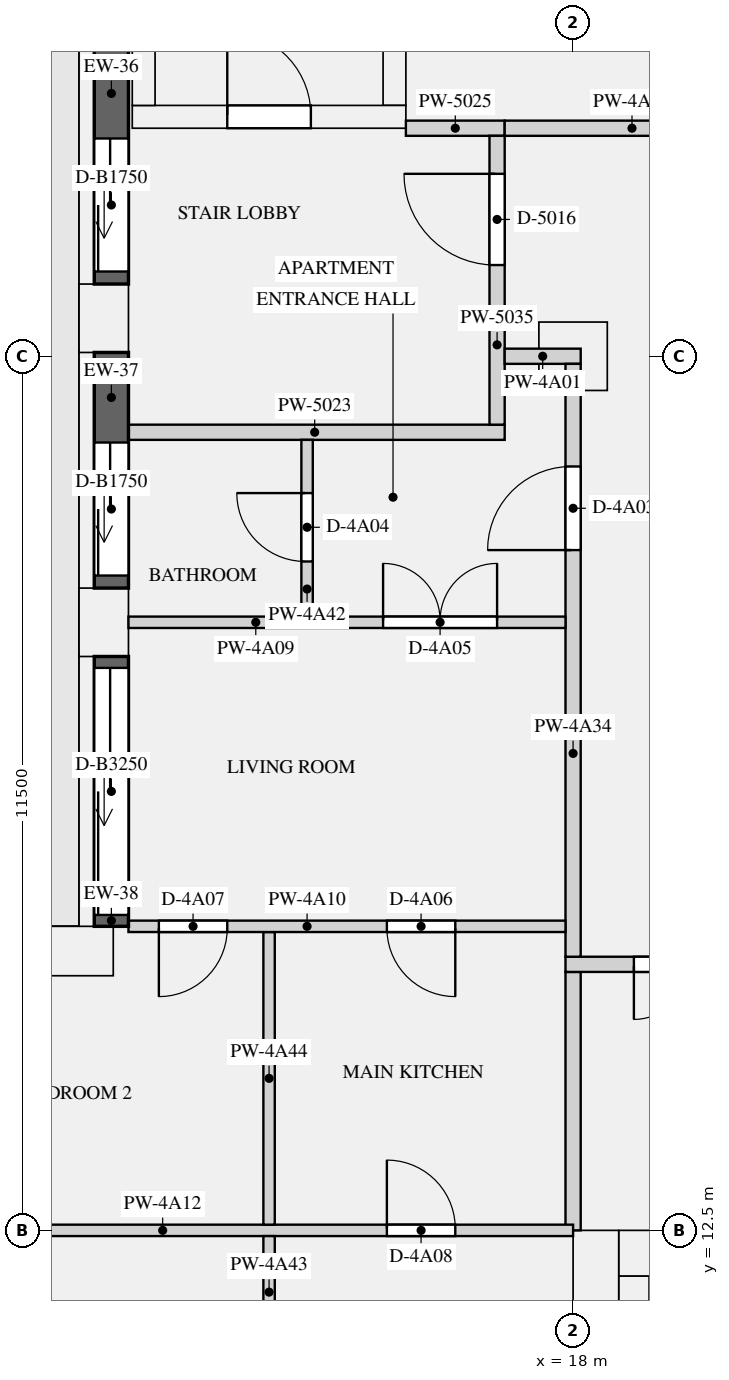
"""IFC4 building model, lengths in metres.
Left out: names, types, materials, properties, quantities, classifications, styles, units other than length and angle.
Written with IfcOpenShell. Run it as: python <this file> out.ifc"""

import sys

from ifc_helpers import new_model, si_unit, direction, frame, frame_2d, origin, origin_2d, place, context, subcontext, project, spatial, rectangle, extrude, element, fill, save


model = new_model("IFC4")
c1 = context("Model", 3, precision=1e-05, world=origin(), true_north=direction((0.0, 1.0)))
c2 = subcontext(c1, "Body", "Model", "MODEL_VIEW")
j1 = project(units=[si_unit("LENGTHUNIT", "METRE"), si_unit("PLANEANGLEUNIT", "RADIAN")], contexts=[c1])
p1 = place(None, origin())
s1 = spatial("IfcSite", under=j1, at=p1, CompositionType="ELEMENT")
p2 = place(p1, origin())
s2 = spatial("IfcBuilding", under=s1, at=p2, CompositionType="ELEMENT")
p3 = place(p2, frame((0.0, 0.0, 198.0)))
s3 = spatial("IfcBuildingStorey", under=s2, at=p3, CompositionType="ELEMENT", Elevation=198.0)
for number, where, z_axis, x_axis in (
    (1, (11.825, 24.5, 0.0), (0.0, 0.0, 1.0), (0.0, -1.0, 0.0)),
    (2, (11.825, 20.5, 0.0), (0.0, 0.0, 1.0), (0.0, -1.0, 0.0)),
    (3, (11.5, 16.175, 0.0), (0.0, 0.0, 1.0), (-1.0, 0.0, 0.0)),
):
    element("IfcColumn", number, at=place(p3, frame(where, z_axis=z_axis, x_axis=x_axis)), inside=s3, PredefinedType="USERDEFINED", context=c2, shape_type="SweptSolid", body=[
        extrude(rectangle(XDim=0.9, YDim=0.65, at=origin_2d()), origin(), (0.0, 0.0, 1.0), 3.15),
    ])
p4 = place(p3, frame((18.0, 24.0, 0.0), z_axis=(0.0, 0.0, 1.0), x_axis=(1.0, 0.0, 0.0)))
e4 = element("IfcColumn", 4, at=p4, inside=s3, PredefinedType="COLUMN", context=c2, shape_type="SweptSolid", body=[
    extrude(rectangle(XDim=0.9, YDim=0.9, at=origin_2d()), origin(), (0.0, 0.0, 1.0), 3.15),
])
p5 = place(p3, frame((18.3, 0.0, 0.0), z_axis=(0.0, 0.0, 1.0), x_axis=(0.0, 1.0, 0.0)))
e5 = element("IfcWall", 5, at=p5, inside=s3, PredefinedType="SHEAR", context=c2, shape_type="SweptSolid", body=[
    extrude(rectangle(XDim=12.5, YDim=0.6, at=frame_2d((6.25, 0.0))), origin(), (0.0, 0.0, 1.0), 3.15),
])
p6 = place(p3, frame((18.6, 12.2, 0.0), z_axis=(0.0, 0.0, 1.0), x_axis=(1.0, 0.0, 0.0)))
e6 = element("IfcWall", 6, at=p6, inside=s3, PredefinedType="SHEAR", context=c2, shape_type="SweptSolid", body=[
    extrude(rectangle(XDim=34.8, YDim=0.6, at=frame_2d((17.4, 0.0))), origin(), (0.0, 0.0, 1.0), 3.15),
])
p7 = place(p6, frame((24.575, 0.0, 0.0)))
e7 = element("IfcOpeningElement", 7, at=p7, cuts=e6, PredefinedType="OPENING", context=c2, shape_type="SweptSolid", body=[
    extrude(rectangle(XDim=1.1, YDim=2.1, at=frame_2d((0.55, 1.05))), frame((0.0, 0.31, 0.0), z_axis=(0.0, -1.0, 0.0), x_axis=(1.0, 0.0, 0.0)), (0.0, 0.0, 1.0), 0.62),
])
p8 = place(p6, frame((26.825, 0.0, 0.0)))
e8 = element("IfcOpeningElement", 8, at=p8, cuts=e6, PredefinedType="OPENING", context=c2, shape_type="SweptSolid", body=[
    extrude(rectangle(XDim=1.1, YDim=2.1, at=frame_2d((0.55, 1.05))), frame((0.0, 0.31, 0.0), z_axis=(0.0, -1.0, 0.0), x_axis=(1.0, 0.0, 0.0)), (0.0, 0.0, 1.0), 0.62),
])
p9 = place(p6, frame((29.075, 0.0, 0.0)))
e9 = element("IfcOpeningElement", 9, at=p9, cuts=e6, PredefinedType="OPENING", context=c2, shape_type="SweptSolid", body=[
    extrude(rectangle(XDim=1.1, YDim=2.1, at=frame_2d((0.55, 1.05))), frame((0.0, 0.31, 0.0), z_axis=(0.0, -1.0, 0.0), x_axis=(1.0, 0.0, 0.0)), (0.0, 0.0, 1.0), 0.62),
])
p10 = place(p6, frame((4.95, 0.0, 0.0)))
e10 = element("IfcOpeningElement", 10, at=p10, cuts=e6, PredefinedType="OPENING", context=c2, shape_type="SweptSolid", body=[
    extrude(rectangle(XDim=0.9, YDim=2.1, at=frame_2d((0.45, 1.05))), frame((0.0, 0.31, 0.0), z_axis=(0.0, -1.0, 0.0), x_axis=(1.0, 0.0, 0.0)), (0.0, 0.0, 1.0), 0.62),
])
p11 = place(p6, frame((18.45, 0.0, 0.0)))
e11 = element("IfcOpeningElement", 11, at=p11, cuts=e6, PredefinedType="OPENING", context=c2, shape_type="SweptSolid", body=[
    extrude(rectangle(XDim=0.9, YDim=2.1, at=frame_2d((0.45, 1.05))), frame((0.0, 0.31, 0.0), z_axis=(0.0, -1.0, 0.0), x_axis=(1.0, 0.0, 0.0)), (0.0, 0.0, 1.0), 0.62),
])
p12 = place(p6, frame((1.55, 0.0, 0.0)))
e12 = element("IfcOpeningElement", 12, at=p12, cuts=e6, PredefinedType="OPENING", context=c2, shape_type="SweptSolid", body=[
    extrude(rectangle(XDim=1.2, YDim=2.1, at=frame_2d((0.6, 1.05))), frame((0.0, 0.31, 0.0), z_axis=(0.0, -1.0, 0.0), x_axis=(1.0, 0.0, 0.0)), (0.0, 0.0, 1.0), 0.62),
])
p13 = place(p6, frame((32.05, 0.0, 0.0)))
e13 = element("IfcOpeningElement", 13, at=p13, cuts=e6, PredefinedType="OPENING", context=c2, shape_type="SweptSolid", body=[
    extrude(rectangle(XDim=1.2, YDim=2.1, at=frame_2d((0.6, 1.05))), frame((0.0, 0.31, 0.0), z_axis=(0.0, -1.0, 0.0), x_axis=(1.0, 0.0, 0.0)), (0.0, 0.0, 1.0), 0.62),
])
p14 = place(p3, frame((18.8, 1.0, 0.0), z_axis=(0.0, 0.0, 1.0), x_axis=(0.0, 1.0, 0.0)))
e14 = element("IfcWall", 14, at=p14, inside=s3, PredefinedType="SHEAR", context=c2, shape_type="SweptSolid", body=[
    extrude(rectangle(XDim=10.9, YDim=0.4, at=frame_2d((5.45, 0.0))), origin(), (0.0, 0.0, 1.0), 3.15),
])
p15 = place(p3, frame((12.2, 27.15, 0.0), z_axis=(0.0, 0.0, 1.0), x_axis=(1.0, 0.0, 0.0)))
e15 = element("IfcWall", 15, at=p15, inside=s3, PredefinedType="SHEAR", context=c2, shape_type="SweptSolid", body=[
    extrude(rectangle(XDim=3.6, YDim=0.3, at=frame_2d((1.8, 0.0))), origin(), (0.0, 0.0, 1.0), 3.15),
])
p16 = place(p15, frame((1.25, 0.0, 0.0)))
e16 = element("IfcOpeningElement", 16, at=p16, cuts=e15, PredefinedType="OPENING", context=c2, shape_type="SweptSolid", body=[
    extrude(rectangle(XDim=1.1, YDim=2.1, at=frame_2d((0.55, 1.05))), frame((0.0, 0.16, 0.0), z_axis=(0.0, -1.0, 0.0), x_axis=(1.0, 0.0, 0.0)), (0.0, 0.0, 1.0), 0.32),
])
for number, where, z_axis, x_axis in (
    (17, (12.35, 27.3, 0.0), (0.0, 0.0, 1.0), (0.0, 1.0, 0.0)),
    (18, (15.65, 27.3, 0.0), (0.0, 0.0, 1.0), (0.0, 1.0, 0.0)),
):
    element("IfcWall", number, at=place(p3, frame(where, z_axis=z_axis, x_axis=x_axis)), inside=s3, PredefinedType="SHEAR", context=c2, shape_type="SweptSolid", body=[
        extrude(rectangle(XDim=7.8, YDim=0.3, at=frame_2d((3.9, 0.0))), origin(), (0.0, 0.0, 1.0), 3.15),
    ])
p17 = place(p3, frame((11.925, 28.05, 0.0), z_axis=(0.0, 0.0, 1.0), x_axis=(0.0, -1.0, 0.0)))
e19 = element("IfcWall", 19, at=p17, inside=s3, PredefinedType="SOLIDWALL", context=c2, shape_type="SweptSolid", body=[
    extrude(rectangle(XDim=3.1, YDim=0.45, at=frame_2d((1.55, 0.0))), origin(), (0.0, 0.0, 1.0), 2.83),
])
p18 = place(p17, frame((1.185, 0.0, 0.0)))
e20 = element("IfcOpeningElement", 20, at=p18, cuts=e19, PredefinedType="OPENING", context=c2, shape_type="SweptSolid", body=[
    extrude(rectangle(XDim=1.75, YDim=2.3, at=frame_2d((0.875, 1.15))), frame((0.0, 0.235, 0.0), z_axis=(0.0, -1.0, 0.0), x_axis=(1.0, 0.0, 0.0)), (0.0, 0.0, 1.0), 0.47),
])
p19 = place(p3, frame((11.925, 24.05, 0.0), z_axis=(0.0, 0.0, 1.0), x_axis=(0.0, -1.0, 0.0)))
e21 = element("IfcWall", 21, at=p19, inside=s3, PredefinedType="SOLIDWALL", context=c2, shape_type="SweptSolid", body=[
    extrude(rectangle(XDim=3.1, YDim=0.45, at=frame_2d((1.55, 0.0))), origin(), (0.0, 0.0, 1.0), 2.83),
])
p20 = place(p19, frame((1.185, 0.0, 0.0)))
e22 = element("IfcOpeningElement", 22, at=p20, cuts=e21, PredefinedType="OPENING", context=c2, shape_type="SweptSolid", body=[
    extrude(rectangle(XDim=1.75, YDim=2.3, at=frame_2d((0.875, 1.15))), frame((0.0, 0.235, 0.0), z_axis=(0.0, -1.0, 0.0), x_axis=(1.0, 0.0, 0.0)), (0.0, 0.0, 1.0), 0.47),
])
p21 = place(p3, frame((11.925, 20.05, 0.0), z_axis=(0.0, 0.0, 1.0), x_axis=(0.0, -1.0, 0.0)))
e23 = element("IfcWall", 23, at=p21, inside=s3, PredefinedType="SOLIDWALL", context=c2, shape_type="SweptSolid", body=[
    extrude(rectangle(XDim=3.55, YDim=0.45, at=frame_2d((1.775, 0.0))), origin(), (0.0, 0.0, 1.0), 2.83),
])
p22 = place(p21, frame((0.15, 0.0, 0.0)))
e24 = element("IfcOpeningElement", 24, at=p22, cuts=e23, PredefinedType="OPENING", context=c2, shape_type="SweptSolid", body=[
    extrude(rectangle(XDim=3.25, YDim=2.3, at=frame_2d((1.625, 1.15))), frame((0.0, 0.235, 0.0), z_axis=(0.0, -1.0, 0.0), x_axis=(1.0, 0.0, 0.0)), (0.0, 0.0, 1.0), 0.47),
])
p23 = place(p3, frame((12.1, 23.0, 0.0), z_axis=(0.0, 0.0, 1.0), x_axis=(1.0, 0.0, 0.0)))
e25 = element("IfcWall", 25, at=p23, inside=s3, PredefinedType="PARTITIONING", context=c2, shape_type="SweptSolid", body=[
    extrude(rectangle(XDim=5.0, YDim=0.2, at=frame_2d((2.5, 0.0))), origin(), (0.0, 0.0, 1.0), 2.83),
])
p24 = place(p3, frame((15.8, 27.0, 0.0), z_axis=(0.0, 0.0, 1.0), x_axis=(1.0, 0.0, 0.0)))
e26 = element("IfcWall", 26, at=p24, inside=s3, PredefinedType="PARTITIONING", context=c2, shape_type="SweptSolid", body=[
    extrude(rectangle(XDim=1.3, YDim=0.2, at=frame_2d((0.65, 0.0))), origin(), (0.0, 0.0, 1.0), 2.83),
])
p25 = place(p3, frame((18.0, 12.5, 0.0), z_axis=(0.0, 0.0, 1.0), x_axis=(0.0, 1.0, 0.0)))
e27 = element("IfcWall", 27, at=p25, inside=s3, PredefinedType="PARTITIONING", context=c2, shape_type="SweptSolid", body=[
    extrude(rectangle(XDim=3.4, YDim=0.2, at=frame_2d((1.7, 0.0))), origin(), (0.0, 0.0, 1.0), 2.83),
])
p26 = place(p3, frame((17.0, 23.1, 0.0), z_axis=(0.0, 0.0, 1.0), x_axis=(0.0, 1.0, 0.0)))
e28 = element("IfcWall", 28, at=p26, inside=s3, PredefinedType="PARTITIONING", context=c2, shape_type="SweptSolid", body=[
    extrude(rectangle(XDim=3.8, YDim=0.2, at=frame_2d((1.9, 0.0))), origin(), (0.0, 0.0, 1.0), 2.83),
])
p27 = place(p26, frame((2.1, 0.0, 0.0)))
e29 = element("IfcOpeningElement", 29, at=p27, cuts=e28, PredefinedType="OPENING", context=c2, shape_type="SweptSolid", body=[
    extrude(rectangle(XDim=1.2, YDim=2.1, at=frame_2d((0.6, 1.05))), frame((0.0, 0.11, 0.0), z_axis=(0.0, -1.0, 0.0), x_axis=(1.0, 0.0, 0.0)), (0.0, 0.0, 1.0), 0.22),
])
p28 = place(p3, frame((17.1, 24.0, 0.0), z_axis=(0.0, 0.0, 1.0), x_axis=(1.0, 0.0, 0.0)))
e30 = element("IfcWall", 30, at=p28, inside=s3, PredefinedType="PARTITIONING", context=c2, shape_type="SweptSolid", body=[
    extrude(rectangle(XDim=1.0, YDim=0.2, at=frame_2d((0.5, 0.0))), origin(), (0.0, 0.0, 1.0), 2.83),
])
p29 = place(p3, frame((17.1, 27.0, 0.0), z_axis=(0.0, 0.0, 1.0), x_axis=(1.0, 0.0, 0.0)))
e31 = element("IfcWall", 31, at=p29, inside=s3, PredefinedType="PARTITIONING", context=c2, shape_type="SweptSolid", body=[
    extrude(rectangle(XDim=6.975, YDim=0.2, at=frame_2d((3.487, 0.0))), origin(), (0.0, 0.0, 1.0), 2.83),
])
p30 = place(p29, frame((3.35, 0.0, 0.0)))
e32 = element("IfcOpeningElement", 32, at=p30, cuts=e31, PredefinedType="OPENING", context=c2, shape_type="SweptSolid", body=[
    extrude(rectangle(XDim=1.1, YDim=2.1, at=frame_2d((0.55, 1.05))), frame((0.0, 0.11, 0.0), z_axis=(0.0, -1.0, 0.0), x_axis=(1.0, 0.0, 0.0)), (0.0, 0.0, 1.0), 0.22),
])
p31 = place(p3, frame((12.15, 20.5, 0.0), z_axis=(0.0, 0.0, 1.0), x_axis=(1.0, 0.0, 0.0)))
e33 = element("IfcWall", 33, at=p31, inside=s3, PredefinedType="PARTITIONING", context=c2, shape_type="SweptSolid", body=[
    extrude(rectangle(XDim=5.75, YDim=0.15, at=frame_2d((2.875, 0.0))), origin(), (0.0, 0.0, 1.0), 2.83),
])
p32 = place(p31, frame((3.35, 0.0, 0.0)))
e34 = element("IfcOpeningElement", 34, at=p32, cuts=e33, PredefinedType="OPENING", context=c2, shape_type="SweptSolid", body=[
    extrude(rectangle(XDim=1.5, YDim=2.1, at=frame_2d((0.75, 1.05))), frame((0.0, 0.085, 0.0), z_axis=(0.0, -1.0, 0.0), x_axis=(1.0, 0.0, 0.0)), (0.0, 0.0, 1.0), 0.17),
])
p33 = place(p3, frame((12.15, 16.5, 0.0), z_axis=(0.0, 0.0, 1.0), x_axis=(1.0, 0.0, 0.0)))
e35 = element("IfcWall", 35, at=p33, inside=s3, PredefinedType="PARTITIONING", context=c2, shape_type="SweptSolid", body=[
    extrude(rectangle(XDim=5.75, YDim=0.15, at=frame_2d((2.875, 0.0))), origin(), (0.0, 0.0, 1.0), 2.83),
])
p34 = place(p33, frame((3.4, 0.0, 0.0)))
e36 = element("IfcOpeningElement", 36, at=p34, cuts=e35, PredefinedType="OPENING", context=c2, shape_type="SweptSolid", body=[
    extrude(rectangle(XDim=0.9, YDim=2.1, at=frame_2d((0.45, 1.05))), frame((0.0, 0.085, 0.0), z_axis=(0.0, -1.0, 0.0), x_axis=(1.0, 0.0, 0.0)), (0.0, 0.0, 1.0), 0.17),
])
p35 = place(p33, frame((0.4, 0.0, 0.0)))
e37 = element("IfcOpeningElement", 37, at=p35, cuts=e35, PredefinedType="OPENING", context=c2, shape_type="SweptSolid", body=[
    extrude(rectangle(XDim=0.9, YDim=2.1, at=frame_2d((0.45, 1.05))), frame((0.0, 0.085, 0.0), z_axis=(0.0, -1.0, 0.0), x_axis=(1.0, 0.0, 0.0)), (0.0, 0.0, 1.0), 0.17),
])
p36 = place(p3, frame((9.65, 12.5, 0.0), z_axis=(0.0, 0.0, 1.0), x_axis=(1.0, 0.0, 0.0)))
e38 = element("IfcWall", 38, at=p36, inside=s3, PredefinedType="PARTITIONING", context=c2, shape_type="SweptSolid", body=[
    extrude(rectangle(XDim=8.35, YDim=0.15, at=frame_2d((4.175, 0.0))), origin(), (0.0, 0.0, 1.0), 2.83),
])
p37 = place(p36, frame((5.9, 0.0, 0.0)))
e39 = element("IfcOpeningElement", 39, at=p37, cuts=e38, PredefinedType="OPENING", context=c2, shape_type="SweptSolid", body=[
    extrude(rectangle(XDim=0.9, YDim=2.1, at=frame_2d((0.45, 1.05))), frame((0.0, 0.085, 0.0), z_axis=(0.0, -1.0, 0.0), x_axis=(1.0, 0.0, 0.0)), (0.0, 0.0, 1.0), 0.17),
])
p38 = place(p3, frame((17.9, 16.0, 0.0), z_axis=(0.0, 0.0, 1.0), x_axis=(1.0, 0.0, 0.0)))
e40 = element("IfcWall", 40, at=p38, inside=s3, PredefinedType="PARTITIONING", context=c2, shape_type="SweptSolid", body=[
    extrude(rectangle(XDim=36.2, YDim=0.2, at=frame_2d((18.1, 0.0))), origin(), (0.0, 0.0, 1.0), 2.83),
])
p39 = place(p38, frame((0.9, 0.0, 0.0)))
e41 = element("IfcOpeningElement", 41, at=p39, cuts=e40, PredefinedType="OPENING", context=c2, shape_type="SweptSolid", body=[
    extrude(rectangle(XDim=1.4, YDim=2.1, at=frame_2d((0.7, 1.05))), frame((0.0, 0.11, 0.0), z_axis=(0.0, -1.0, 0.0), x_axis=(1.0, 0.0, 0.0)), (0.0, 0.0, 1.0), 0.22),
])
p40 = place(p38, frame((33.9, 0.0, 0.0)))
e42 = element("IfcOpeningElement", 42, at=p40, cuts=e40, PredefinedType="OPENING", context=c2, shape_type="SweptSolid", body=[
    extrude(rectangle(XDim=1.4, YDim=2.1, at=frame_2d((0.7, 1.05))), frame((0.0, 0.11, 0.0), z_axis=(0.0, -1.0, 0.0), x_axis=(1.0, 0.0, 0.0)), (0.0, 0.0, 1.0), 0.22),
])
p41 = place(p3, frame((18.0, 16.1, 0.0), z_axis=(0.0, 0.0, 1.0), x_axis=(0.0, 1.0, 0.0)))
e43 = element("IfcWall", 43, at=p41, inside=s3, PredefinedType="PARTITIONING", context=c2, shape_type="SweptSolid", body=[
    extrude(rectangle(XDim=7.8, YDim=0.2, at=frame_2d((3.9, 0.0))), origin(), (0.0, 0.0, 1.0), 2.83),
])
p42 = place(p41, frame((5.35, 0.0, 0.0)))
e44 = element("IfcOpeningElement", 44, at=p42, cuts=e43, PredefinedType="OPENING", context=c2, shape_type="SweptSolid", body=[
    extrude(rectangle(XDim=1.1, YDim=2.1, at=frame_2d((0.55, 1.05))), frame((0.0, 0.11, 0.0), z_axis=(0.0, -1.0, 0.0), x_axis=(1.0, 0.0, 0.0)), (0.0, 0.0, 1.0), 0.22),
])
p43 = place(p3, frame((14.5, 20.575, 0.0), z_axis=(0.0, 0.0, 1.0), x_axis=(0.0, 1.0, 0.0)))
e45 = element("IfcWall", 45, at=p43, inside=s3, PredefinedType="PARTITIONING", context=c2, shape_type="SweptSolid", body=[
    extrude(rectangle(XDim=2.325, YDim=0.15, at=frame_2d((1.163, 0.0))), origin(), (0.0, 0.0, 1.0), 2.83),
])
p44 = place(p43, frame((0.725, 0.0, 0.0)))
e46 = element("IfcOpeningElement", 46, at=p44, cuts=e45, PredefinedType="OPENING", context=c2, shape_type="SweptSolid", body=[
    extrude(rectangle(XDim=0.9, YDim=2.1, at=frame_2d((0.45, 1.05))), frame((0.0, 0.085, 0.0), z_axis=(0.0, -1.0, 0.0), x_axis=(1.0, 0.0, 0.0)), (0.0, 0.0, 1.0), 0.17),
])
p45 = place(p3, frame((14.0, 8.575, 0.0), z_axis=(0.0, 0.0, 1.0), x_axis=(0.0, 1.0, 0.0)))
e47 = element("IfcWall", 47, at=p45, inside=s3, PredefinedType="PARTITIONING", context=c2, shape_type="SweptSolid", body=[
    extrude(rectangle(XDim=3.85, YDim=0.15, at=frame_2d((1.925, 0.0))), origin(), (0.0, 0.0, 1.0), 2.83),
])
p46 = place(p45, frame((1.475, 0.0, 0.0)))
e48 = element("IfcOpeningElement", 48, at=p46, cuts=e47, PredefinedType="OPENING", context=c2, shape_type="SweptSolid", body=[
    extrude(rectangle(XDim=0.9, YDim=2.1, at=frame_2d((0.45, 1.05))), frame((0.0, 0.085, 0.0), z_axis=(0.0, -1.0, 0.0), x_axis=(1.0, 0.0, 0.0)), (0.0, 0.0, 1.0), 0.17),
])
p47 = place(p3, frame((14.0, 12.575, 0.0), z_axis=(0.0, 0.0, 1.0), x_axis=(0.0, 1.0, 0.0)))
e49 = element("IfcWall", 49, at=p47, inside=s3, PredefinedType="PARTITIONING", context=c2, shape_type="SweptSolid", body=[
    extrude(rectangle(XDim=3.85, YDim=0.15, at=frame_2d((1.925, 0.0))), origin(), (0.0, 0.0, 1.0), 2.83),
])
p48 = place(p18, frame((1.75, -0.19, 0.0), z_axis=(0.0, 0.0, 1.0), x_axis=(-1.0, 0.0, 0.0)))
e50 = element("IfcDoor", 50, at=p48, inside=s3, OperationType="SLIDING_TO_LEFT", PredefinedType="DOOR", context=c2, shape_type="SweptSolid", body=[
    extrude(rectangle(XDim=1.75, YDim=2.3, at=frame_2d((0.875, 1.15))), frame((0.0, -0.07, 0.0), z_axis=(0.0, -1.0, 0.0), x_axis=(1.0, 0.0, 0.0)), (0.0, 0.0, 1.0), 0.05),
])
fill(e20, e50)
p49 = place(p20, origin())
e51 = element("IfcDoor", 51, at=p49, inside=s3, OperationType="SLIDING_TO_LEFT", PredefinedType="DOOR", context=c2, shape_type="SweptSolid", body=[
    extrude(rectangle(XDim=1.75, YDim=2.3, at=frame_2d((0.875, 1.15))), frame((0.0, -0.07, 0.0), z_axis=(0.0, -1.0, 0.0), x_axis=(1.0, 0.0, 0.0)), (0.0, 0.0, 1.0), 0.05),
])
fill(e22, e51)
p50 = place(p22, origin())
e52 = element("IfcDoor", 52, at=p50, inside=s3, OperationType="SLIDING_TO_LEFT", PredefinedType="DOOR", context=c2, shape_type="SweptSolid", body=[
    extrude(rectangle(XDim=3.25, YDim=2.3, at=frame_2d((1.625, 1.15))), frame((0.0, -0.07, 0.0), z_axis=(0.0, -1.0, 0.0), x_axis=(1.0, 0.0, 0.0)), (0.0, 0.0, 1.0), 0.05),
])
fill(e24, e52)
p51 = place(p16, origin())
e53 = element("IfcDoor", 53, at=p51, inside=s3, OperationType="SINGLE_SWING_LEFT", PredefinedType="DOOR", context=c2, shape_type="SweptSolid", body=[
    extrude(rectangle(XDim=1.1, YDim=2.1, at=frame_2d((0.55, 1.05))), frame((0.0, 0.025, 0.0), z_axis=(0.0, -1.0, 0.0), x_axis=(1.0, 0.0, 0.0)), (0.0, 0.0, 1.0), 0.05),
])
fill(e16, e53)
p52 = place(p27, origin())
e54 = element("IfcDoor", 54, at=p52, inside=s3, OperationType="SINGLE_SWING_RIGHT", PredefinedType="DOOR", context=c2, shape_type="SweptSolid", body=[
    extrude(rectangle(XDim=1.2, YDim=2.1, at=frame_2d((0.6, 1.05))), frame((0.0, 0.025, 0.0), z_axis=(0.0, -1.0, 0.0), x_axis=(1.0, 0.0, 0.0)), (0.0, 0.0, 1.0), 0.05),
])
fill(e29, e54)
p53 = place(p39, frame((1.4, 0.0, 0.0), z_axis=(0.0, 0.0, 1.0), x_axis=(-1.0, 0.0, 0.0)))
e55 = element("IfcDoor", 55, at=p53, inside=s3, OperationType="DOUBLE_DOOR_SINGLE_SWING", PredefinedType="DOOR", context=c2, shape_type="SweptSolid", body=[
    extrude(rectangle(XDim=1.4, YDim=2.1, at=frame_2d((0.7, 1.05))), frame((0.0, 0.025, 0.0), z_axis=(0.0, -1.0, 0.0), x_axis=(1.0, 0.0, 0.0)), (0.0, 0.0, 1.0), 0.05),
])
fill(e41, e55)
p54 = place(p42, origin())
e56 = element("IfcDoor", 56, at=p54, inside=s3, OperationType="SINGLE_SWING_LEFT", PredefinedType="DOOR", context=c2, shape_type="SweptSolid", body=[
    extrude(rectangle(XDim=1.1, YDim=2.1, at=frame_2d((0.55, 1.05))), frame((0.0, 0.025, 0.0), z_axis=(0.0, -1.0, 0.0), x_axis=(1.0, 0.0, 0.0)), (0.0, 0.0, 1.0), 0.05),
])
fill(e44, e56)
p55 = place(p44, origin())
e57 = element("IfcDoor", 57, at=p55, inside=s3, OperationType="SINGLE_SWING_RIGHT", PredefinedType="DOOR", context=c2, shape_type="SweptSolid", body=[
    extrude(rectangle(XDim=0.9, YDim=2.1, at=frame_2d((0.45, 1.05))), frame((0.0, 0.025, 0.0), z_axis=(0.0, -1.0, 0.0), x_axis=(1.0, 0.0, 0.0)), (0.0, 0.0, 1.0), 0.05),
])
fill(e46, e57)
p56 = place(p32, origin())
e58 = element("IfcDoor", 58, at=p56, inside=s3, OperationType="DOUBLE_DOOR_SINGLE_SWING", PredefinedType="DOOR", context=c2, shape_type="SweptSolid", body=[
    extrude(rectangle(XDim=1.5, YDim=2.1, at=frame_2d((0.75, 1.05))), frame((0.0, 0.025, 0.0), z_axis=(0.0, -1.0, 0.0), x_axis=(1.0, 0.0, 0.0)), (0.0, 0.0, 1.0), 0.05),
])
fill(e34, e58)
p57 = place(p34, frame((0.9, 0.0, 0.0), z_axis=(0.0, 0.0, 1.0), x_axis=(-1.0, 0.0, 0.0)))
e59 = element("IfcDoor", 59, at=p57, inside=s3, OperationType="SINGLE_SWING_LEFT", PredefinedType="DOOR", context=c2, shape_type="SweptSolid", body=[
    extrude(rectangle(XDim=0.9, YDim=2.1, at=frame_2d((0.45, 1.05))), frame((0.0, 0.025, 0.0), z_axis=(0.0, -1.0, 0.0), x_axis=(1.0, 0.0, 0.0)), (0.0, 0.0, 1.0), 0.05),
])
fill(e36, e59)
p58 = place(p35, frame((0.9, 0.0, 0.0), z_axis=(0.0, 0.0, 1.0), x_axis=(-1.0, 0.0, 0.0)))
e60 = element("IfcDoor", 60, at=p58, inside=s3, OperationType="SINGLE_SWING_RIGHT", PredefinedType="DOOR", context=c2, shape_type="SweptSolid", body=[
    extrude(rectangle(XDim=0.9, YDim=2.1, at=frame_2d((0.45, 1.05))), frame((0.0, 0.025, 0.0), z_axis=(0.0, -1.0, 0.0), x_axis=(1.0, 0.0, 0.0)), (0.0, 0.0, 1.0), 0.05),
])
fill(e37, e60)
p59 = place(p37, origin())
e61 = element("IfcDoor", 61, at=p59, inside=s3, OperationType="SINGLE_SWING_LEFT", PredefinedType="DOOR", context=c2, shape_type="SweptSolid", body=[
    extrude(rectangle(XDim=0.9, YDim=2.1, at=frame_2d((0.45, 1.05))), frame((0.0, 0.025, 0.0), z_axis=(0.0, -1.0, 0.0), x_axis=(1.0, 0.0, 0.0)), (0.0, 0.0, 1.0), 0.05),
])
fill(e39, e61)
save(model, sys.argv[1])
